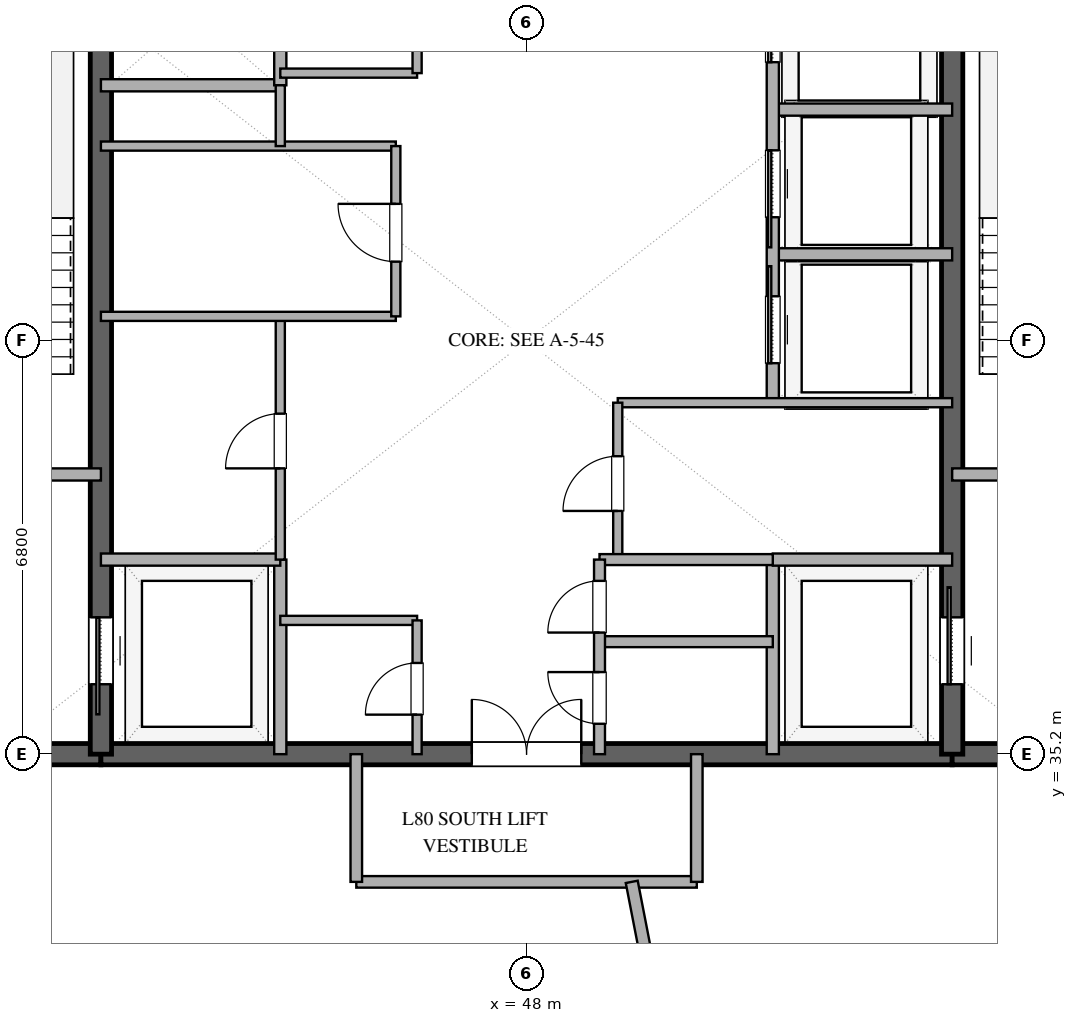
"""IFC4 building model, lengths in metres.
Left out: names, types, materials, properties, quantities, classifications, styles, units other than length and angle.
Written with IfcOpenShell. Run it as: python <this file> out.ifc"""

import sys

from ifc_helpers import new_model, si_unit, direction, frame, frame_2d, origin, place, context, subcontext, project, spatial, rectangle, extrude, element, fill, save


model = new_model("IFC4")
c1 = context("Model", 3, precision=1e-05, world=origin(), true_north=direction((0.0, 1.0)))
c2 = subcontext(c1, "Body", "Model", "MODEL_VIEW")
j1 = project(units=[si_unit("LENGTHUNIT", "METRE"), si_unit("PLANEANGLEUNIT", "RADIAN")], contexts=[c1])
p1 = place(None, origin())
s1 = spatial("IfcSite", under=j1, at=p1, CompositionType="ELEMENT")
p2 = place(p1, origin())
s2 = spatial("IfcBuilding", under=s1, at=p2, CompositionType="ELEMENT")
p3 = place(p2, frame((0.0, 0.0, 309.0)))
s3 = spatial("IfcBuildingStorey", under=s2, at=p3, CompositionType="ELEMENT", Elevation=309.0)
p4 = place(p3, frame((37.0, 35.2, 0.0), z_axis=(0.0, 0.0, 1.0), x_axis=(1.0, 0.0, 0.0)))
e1 = element("IfcWall", 1, at=p4, inside=s3, PredefinedType="SHEAR", context=c2, shape_type="SweptSolid", body=[
    extrude(rectangle(XDim=4.0, YDim=0.35, at=frame_2d((2.0, 0.0))), origin(), (0.0, 0.0, 1.0), 3.37),
])
p5 = place(p3, frame((41.0, 35.2, 0.0), z_axis=(0.0, 0.0, 1.0), x_axis=(1.0, 0.0, 0.0)))
e2 = element("IfcWall", 2, at=p5, inside=s3, PredefinedType="SHEAR", context=c2, shape_type="SweptSolid", body=[
    extrude(rectangle(XDim=14.0, YDim=0.35, at=frame_2d((7.0, 0.0))), origin(), (0.0, 0.0, 1.0), 3.37),
])
p6 = place(p5, frame((6.1, 0.0, 0.0)))
e3 = element("IfcOpeningElement", 3, at=p6, cuts=e2, PredefinedType="OPENING", context=c2, shape_type="SweptSolid", body=[
    extrude(rectangle(XDim=1.8, YDim=2.25, at=frame_2d((0.9, 1.125))), frame((0.0, 0.185, 0.0), z_axis=(0.0, -1.0, 0.0), x_axis=(1.0, 0.0, 0.0)), (0.0, 0.0, 1.0), 0.37),
])
p7 = place(p3, frame((55.0, 35.2, 0.0), z_axis=(0.0, 0.0, 1.0), x_axis=(1.0, 0.0, 0.0)))
e4 = element("IfcWall", 4, at=p7, inside=s3, PredefinedType="SHEAR", context=c2, shape_type="SweptSolid", body=[
    extrude(rectangle(XDim=4.0, YDim=0.35, at=frame_2d((2.0, 0.0))), origin(), (0.0, 0.0, 1.0), 3.37),
])
p8 = place(p3, frame((41.0, 35.2, 0.0), z_axis=(0.0, 0.0, 1.0), x_axis=(0.0, 1.0, 0.0)))
e5 = element("IfcWall", 5, at=p8, inside=s3, PredefinedType="SHEAR", context=c2, shape_type="SweptSolid", body=[
    extrude(rectangle(XDim=13.6, YDim=0.35, at=frame_2d((6.8, 0.0))), origin(), (0.0, 0.0, 1.0), 3.37),
])
p9 = place(p8, frame((1.15, 0.0, 0.0)))
e6 = element("IfcOpeningElement", 6, at=p9, cuts=e5, PredefinedType="OPENING", context=c2, shape_type="SweptSolid", body=[
    extrude(rectangle(XDim=1.1, YDim=2.2, at=frame_2d((0.55, 1.1))), frame((0.0, 0.185, 0.0), z_axis=(0.0, -1.0, 0.0), x_axis=(1.0, 0.0, 0.0)), (0.0, 0.0, 1.0), 0.37),
])
p10 = place(p3, frame((55.0, 35.2, 0.0), z_axis=(0.0, 0.0, 1.0), x_axis=(0.0, 1.0, 0.0)))
e7 = element("IfcWall", 7, at=p10, inside=s3, PredefinedType="SHEAR", context=c2, shape_type="SweptSolid", body=[
    extrude(rectangle(XDim=13.6, YDim=0.35, at=frame_2d((6.8, 0.0))), origin(), (0.0, 0.0, 1.0), 3.37),
])
p11 = place(p10, frame((1.15, 0.0, 0.0)))
e8 = element("IfcOpeningElement", 8, at=p11, cuts=e7, PredefinedType="OPENING", context=c2, shape_type="SweptSolid", body=[
    extrude(rectangle(XDim=1.1, YDim=2.2, at=frame_2d((0.55, 1.1))), frame((0.0, 0.185, 0.0), z_axis=(0.0, -1.0, 0.0), x_axis=(1.0, 0.0, 0.0)), (0.0, 0.0, 1.0), 0.37),
])
p12 = place(p3, frame((37.0, 39.8, 0.0), z_axis=(0.0, 0.0, 1.0), x_axis=(1.0, 0.0, 0.0)))
e9 = element("IfcWall", 9, at=p12, inside=s3, PredefinedType="SOLIDWALL", context=c2, shape_type="SweptSolid", body=[
    extrude(rectangle(XDim=4.0, YDim=0.2, at=frame_2d((2.0, 0.0))), origin(), (0.0, 0.0, 1.0), 2.73),
])
p13 = place(p12, frame((1.45, 0.0, 0.0)))
e10 = element("IfcOpeningElement", 10, at=p13, cuts=e9, PredefinedType="OPENING", context=c2, shape_type="SweptSolid", body=[
    extrude(rectangle(XDim=1.1, YDim=2.15, at=frame_2d((0.55, 1.075))), frame((0.0, 0.11, 0.0), z_axis=(0.0, -1.0, 0.0), x_axis=(1.0, 0.0, 0.0)), (0.0, 0.0, 1.0), 0.22),
])
p14 = place(p3, frame((55.0, 39.8, 0.0), z_axis=(0.0, 0.0, 1.0), x_axis=(1.0, 0.0, 0.0)))
e11 = element("IfcWall", 11, at=p14, inside=s3, PredefinedType="SOLIDWALL", context=c2, shape_type="SweptSolid", body=[
    extrude(rectangle(XDim=4.0, YDim=0.2, at=frame_2d((2.0, 0.0))), origin(), (0.0, 0.0, 1.0), 2.73),
])
p15 = place(p14, frame((1.45, 0.0, 0.0)))
e12 = element("IfcOpeningElement", 12, at=p15, cuts=e11, PredefinedType="OPENING", context=c2, shape_type="SweptSolid", body=[
    extrude(rectangle(XDim=1.1, YDim=2.15, at=frame_2d((0.55, 1.075))), frame((0.0, 0.11, 0.0), z_axis=(0.0, -1.0, 0.0), x_axis=(1.0, 0.0, 0.0)), (0.0, 0.0, 1.0), 0.22),
])
p16 = place(p3, frame((43.95, 35.2, 0.0), z_axis=(0.0, 0.0, 1.0), x_axis=(0.0, 1.0, 0.0)))
e13 = element("IfcWall", 13, at=p16, inside=s3, PredefinedType="SOLIDWALL", context=c2, shape_type="SweptSolid", body=[
    extrude(rectangle(XDim=3.2, YDim=0.2, at=frame_2d((1.6, 0.0))), origin(), (0.0, 0.0, 1.0), 2.73),
])
p17 = place(p3, frame((41.0, 38.4, 0.0), z_axis=(0.0, 0.0, 1.0), x_axis=(1.0, 0.0, 0.0)))
e14 = element("IfcWall", 14, at=p17, inside=s3, PredefinedType="SOLIDWALL", context=c2, shape_type="SweptSolid", body=[
    extrude(rectangle(XDim=2.95, YDim=0.2, at=frame_2d((1.475, 0.0))), origin(), (0.0, 0.0, 1.0), 2.73),
])
p18 = place(p3, frame((52.05, 35.2, 0.0), z_axis=(0.0, 0.0, 1.0), x_axis=(0.0, 1.0, 0.0)))
e15 = element("IfcWall", 15, at=p18, inside=s3, PredefinedType="SOLIDWALL", context=c2, shape_type="SweptSolid", body=[
    extrude(rectangle(XDim=3.2, YDim=0.2, at=frame_2d((1.6, 0.0))), origin(), (0.0, 0.0, 1.0), 2.73),
])
for number, where, z_axis, x_axis in (
    (16, (52.05, 38.4, 0.0), (0.0, 0.0, 1.0), (1.0, 0.0, 0.0)),
    (17, (41.0, 46.2, 0.0), (0.0, 0.0, 1.0), (1.0, 0.0, 0.0)),
):
    element("IfcWall", number, at=place(p3, frame(where, z_axis=z_axis, x_axis=x_axis)), inside=s3, PredefinedType="SOLIDWALL", context=c2, shape_type="SweptSolid", body=[
        extrude(rectangle(XDim=2.95, YDim=0.2, at=frame_2d((1.475, 0.0))), origin(), (0.0, 0.0, 1.0), 2.73),
    ])
p19 = place(p3, frame((43.95, 46.2, 0.0), z_axis=(0.0, 0.0, 1.0), x_axis=(0.0, 1.0, 0.0)))
e18 = element("IfcWall", 18, at=p19, inside=s3, PredefinedType="SOLIDWALL", context=c2, shape_type="SweptSolid", body=[
    extrude(rectangle(XDim=2.6, YDim=0.2, at=frame_2d((1.3, 0.0))), origin(), (0.0, 0.0, 1.0), 2.73),
])
p20 = place(p19, frame((0.8, 0.0, 0.0)))
e19 = element("IfcOpeningElement", 19, at=p20, cuts=e18, PredefinedType="OPENING", context=c2, shape_type="SweptSolid", body=[
    extrude(rectangle(XDim=0.85, YDim=2.15, at=frame_2d((0.425, 1.075))), frame((0.0, 0.11, 0.0), z_axis=(0.0, -1.0, 0.0), x_axis=(1.0, 0.0, 0.0)), (0.0, 0.0, 1.0), 0.22),
])
p21 = place(p3, frame((43.95, 38.4, 0.0), z_axis=(0.0, 0.0, 1.0), x_axis=(0.0, 1.0, 0.0)))
e20 = element("IfcWall", 20, at=p21, inside=s3, PredefinedType="PARTITIONING", context=c2, shape_type="SweptSolid", body=[
    extrude(rectangle(XDim=4.0, YDim=0.15, at=frame_2d((2.0, 0.0))), origin(), (0.0, 0.0, 1.0), 2.73),
])
p22 = place(p21, frame((1.5, 0.0, 0.0)))
e21 = element("IfcOpeningElement", 21, at=p22, cuts=e20, PredefinedType="OPENING", context=c2, shape_type="SweptSolid", body=[
    extrude(rectangle(XDim=0.9, YDim=2.15, at=frame_2d((0.45, 1.075))), frame((0.0, 0.085, 0.0), z_axis=(0.0, -1.0, 0.0), x_axis=(1.0, 0.0, 0.0)), (0.0, 0.0, 1.0), 0.17),
])
for number, where, z_axis, x_axis in (
    (22, (41.0, 42.4, 0.0), (0.0, 0.0, 1.0), (1.0, 0.0, 0.0)),
    (23, (41.0, 45.2, 0.0), (0.0, 0.0, 1.0), (1.0, 0.0, 0.0)),
):
    element("IfcWall", number, at=place(p3, frame(where, z_axis=z_axis, x_axis=x_axis)), inside=s3, PredefinedType="PARTITIONING", context=c2, shape_type="SweptSolid", body=[
        extrude(rectangle(XDim=4.85, YDim=0.15, at=frame_2d((2.425, 0.0))), origin(), (0.0, 0.0, 1.0), 2.73),
    ])
p23 = place(p3, frame((43.95, 45.2, 0.0), z_axis=(0.0, 0.0, 1.0), x_axis=(0.0, 1.0, 0.0)))
e24 = element("IfcWall", 24, at=p23, inside=s3, PredefinedType="PARTITIONING", context=c2, shape_type="SweptSolid", body=[
    extrude(rectangle(XDim=1.0, YDim=0.15, at=frame_2d((0.5, 0.0))), origin(), (0.0, 0.0, 1.0), 2.73),
])
p24 = place(p3, frame((45.85, 42.4, 0.0), z_axis=(0.0, 0.0, 1.0), x_axis=(0.0, 1.0, 0.0)))
e25 = element("IfcWall", 25, at=p24, inside=s3, PredefinedType="PARTITIONING", context=c2, shape_type="SweptSolid", body=[
    extrude(rectangle(XDim=2.8, YDim=0.15, at=frame_2d((1.4, 0.0))), origin(), (0.0, 0.0, 1.0), 2.73),
])
p25 = place(p24, frame((0.9, 0.0, 0.0)))
e26 = element("IfcOpeningElement", 26, at=p25, cuts=e25, PredefinedType="OPENING", context=c2, shape_type="SweptSolid", body=[
    extrude(rectangle(XDim=0.95, YDim=2.15, at=frame_2d((0.475, 1.075))), frame((0.0, 0.085, 0.0), z_axis=(0.0, -1.0, 0.0), x_axis=(1.0, 0.0, 0.0)), (0.0, 0.0, 1.0), 0.17),
])
for number, where, z_axis, x_axis in (
    (27, (52.05, 43.42, 0.0), (0.0, 0.0, 1.0), (1.0, 0.0, 0.0)),
    (28, (52.05, 45.8, 0.0), (0.0, 0.0, 1.0), (1.0, 0.0, 0.0)),
):
    element("IfcWall", number, at=place(p3, frame(where, z_axis=z_axis, x_axis=x_axis)), inside=s3, PredefinedType="SOLIDWALL", context=c2, shape_type="SweptSolid", body=[
        extrude(rectangle(XDim=2.95, YDim=0.2, at=frame_2d((1.475, 0.0))), origin(), (0.0, 0.0, 1.0), 2.73),
    ])
p26 = place(p3, frame((52.05, 40.98, 0.0), z_axis=(0.0, 0.0, 1.0), x_axis=(0.0, 1.0, 0.0)))
e29 = element("IfcWall", 29, at=p26, inside=s3, PredefinedType="SOLIDWALL", context=c2, shape_type="SweptSolid", body=[
    extrude(rectangle(XDim=7.82, YDim=0.2, at=frame_2d((3.91, 0.0))), origin(), (0.0, 0.0, 1.0), 2.73),
])
p27 = place(p26, frame((0.65, 0.0, 0.0)))
e30 = element("IfcOpeningElement", 30, at=p27, cuts=e29, PredefinedType="OPENING", context=c2, shape_type="SweptSolid", body=[
    extrude(rectangle(XDim=1.1, YDim=2.2, at=frame_2d((0.55, 1.1))), frame((0.0, 0.11, 0.0), z_axis=(0.0, -1.0, 0.0), x_axis=(1.0, 0.0, 0.0)), (0.0, 0.0, 1.0), 0.22),
])
p28 = place(p26, frame((3.05, 0.0, 0.0)))
e31 = element("IfcOpeningElement", 31, at=p28, cuts=e29, PredefinedType="OPENING", context=c2, shape_type="SweptSolid", body=[
    extrude(rectangle(XDim=1.1, YDim=2.2, at=frame_2d((0.55, 1.1))), frame((0.0, 0.11, 0.0), z_axis=(0.0, -1.0, 0.0), x_axis=(1.0, 0.0, 0.0)), (0.0, 0.0, 1.0), 0.22),
])
p29 = place(p26, frame((5.6, 0.0, 0.0)))
e32 = element("IfcOpeningElement", 32, at=p29, cuts=e29, PredefinedType="OPENING", context=c2, shape_type="SweptSolid", body=[
    extrude(rectangle(XDim=1.2, YDim=2.2, at=frame_2d((0.6, 1.1))), frame((0.0, 0.11, 0.0), z_axis=(0.0, -1.0, 0.0), x_axis=(1.0, 0.0, 0.0)), (0.0, 0.0, 1.0), 0.22),
])
p30 = place(p3, frame((49.5, 40.98, 0.0), z_axis=(0.0, 0.0, 1.0), x_axis=(1.0, 0.0, 0.0)))
e33 = element("IfcWall", 33, at=p30, inside=s3, PredefinedType="PARTITIONING", context=c2, shape_type="SweptSolid", body=[
    extrude(rectangle(XDim=5.5, YDim=0.15, at=frame_2d((2.75, 0.0))), origin(), (0.0, 0.0, 1.0), 2.73),
])
p31 = place(p3, frame((49.5, 38.4, 0.0), z_axis=(0.0, 0.0, 1.0), x_axis=(0.0, 1.0, 0.0)))
e34 = element("IfcWall", 34, at=p31, inside=s3, PredefinedType="PARTITIONING", context=c2, shape_type="SweptSolid", body=[
    extrude(rectangle(XDim=2.58, YDim=0.15, at=frame_2d((1.29, 0.0))), origin(), (0.0, 0.0, 1.0), 2.73),
])
p32 = place(p31, frame((0.8, 0.0, 0.0)))
e35 = element("IfcOpeningElement", 35, at=p32, cuts=e34, PredefinedType="OPENING", context=c2, shape_type="SweptSolid", body=[
    extrude(rectangle(XDim=0.9, YDim=2.15, at=frame_2d((0.45, 1.075))), frame((0.0, 0.085, 0.0), z_axis=(0.0, -1.0, 0.0), x_axis=(1.0, 0.0, 0.0)), (0.0, 0.0, 1.0), 0.17),
])
p33 = place(p3, frame((43.95, 37.4, 0.0), z_axis=(0.0, 0.0, 1.0), x_axis=(1.0, 0.0, 0.0)))
e36 = element("IfcWall", 36, at=p33, inside=s3, PredefinedType="PARTITIONING", context=c2, shape_type="SweptSolid", body=[
    extrude(rectangle(XDim=2.25, YDim=0.15, at=frame_2d((1.125, 0.0))), origin(), (0.0, 0.0, 1.0), 2.73),
])
p34 = place(p3, frame((46.2, 35.2, 0.0), z_axis=(0.0, 0.0, 1.0), x_axis=(0.0, 1.0, 0.0)))
e37 = element("IfcWall", 37, at=p34, inside=s3, PredefinedType="PARTITIONING", context=c2, shape_type="SweptSolid", body=[
    extrude(rectangle(XDim=2.2, YDim=0.15, at=frame_2d((1.1, 0.0))), origin(), (0.0, 0.0, 1.0), 2.73),
])
p35 = place(p34, frame((0.65, 0.0, 0.0)))
e38 = element("IfcOpeningElement", 38, at=p35, cuts=e37, PredefinedType="OPENING", context=c2, shape_type="SweptSolid", body=[
    extrude(rectangle(XDim=0.85, YDim=2.15, at=frame_2d((0.425, 1.075))), frame((0.0, 0.085, 0.0), z_axis=(0.0, -1.0, 0.0), x_axis=(1.0, 0.0, 0.0)), (0.0, 0.0, 1.0), 0.17),
])
p36 = place(p3, frame((43.95, 46.4, 0.0), z_axis=(0.0, 0.0, 1.0), x_axis=(1.0, 0.0, 0.0)))
e39 = element("IfcWall", 39, at=p36, inside=s3, PredefinedType="PARTITIONING", context=c2, shape_type="SweptSolid", body=[
    extrude(rectangle(XDim=2.25, YDim=0.15, at=frame_2d((1.125, 0.0))), origin(), (0.0, 0.0, 1.0), 2.73),
])
p37 = place(p3, frame((46.2, 46.4, 0.0), z_axis=(0.0, 0.0, 1.0), x_axis=(0.0, 1.0, 0.0)))
e40 = element("IfcWall", 40, at=p37, inside=s3, PredefinedType="PARTITIONING", context=c2, shape_type="SweptSolid", body=[
    extrude(rectangle(XDim=2.4, YDim=0.15, at=frame_2d((1.2, 0.0))), origin(), (0.0, 0.0, 1.0), 2.73),
])
p38 = place(p37, frame((0.75, 0.0, 0.0)))
e41 = element("IfcOpeningElement", 41, at=p38, cuts=e40, PredefinedType="OPENING", context=c2, shape_type="SweptSolid", body=[
    extrude(rectangle(XDim=0.85, YDim=2.15, at=frame_2d((0.425, 1.075))), frame((0.0, 0.085, 0.0), z_axis=(0.0, -1.0, 0.0), x_axis=(1.0, 0.0, 0.0)), (0.0, 0.0, 1.0), 0.17),
])
for number, where, z_axis, x_axis in (
    (42, (49.2, 37.05, 0.0), (0.0, 0.0, 1.0), (1.0, 0.0, 0.0)),
    (43, (49.2, 38.4, 0.0), (0.0, 0.0, 1.0), (1.0, 0.0, 0.0)),
):
    element("IfcWall", number, at=place(p3, frame(where, z_axis=z_axis, x_axis=x_axis)), inside=s3, PredefinedType="PLUMBINGWALL", context=c2, shape_type="SweptSolid", body=[
        extrude(rectangle(XDim=2.85, YDim=0.18, at=frame_2d((1.425, 0.0))), origin(), (0.0, 0.0, 1.0), 2.73),
    ])
p39 = place(p3, frame((49.2, 35.2, 0.0), z_axis=(0.0, 0.0, 1.0), x_axis=(0.0, 1.0, 0.0)))
e44 = element("IfcWall", 44, at=p39, inside=s3, PredefinedType="PLUMBINGWALL", context=c2, shape_type="SweptSolid", body=[
    extrude(rectangle(XDim=3.2, YDim=0.18, at=frame_2d((1.6, 0.0))), origin(), (0.0, 0.0, 1.0), 2.73),
])
p40 = place(p39, frame((0.5, 0.0, 0.0)))
e45 = element("IfcOpeningElement", 45, at=p40, cuts=e44, PredefinedType="OPENING", context=c2, shape_type="SweptSolid", body=[
    extrude(rectangle(XDim=0.85, YDim=2.1, at=frame_2d((0.425, 1.05))), frame((0.0, 0.1, 0.0), z_axis=(0.0, -1.0, 0.0), x_axis=(1.0, 0.0, 0.0)), (0.0, 0.0, 1.0), 0.2),
])
p41 = place(p39, frame((2.0, 0.0, 0.0)))
e46 = element("IfcOpeningElement", 46, at=p41, cuts=e44, PredefinedType="OPENING", context=c2, shape_type="SweptSolid", body=[
    extrude(rectangle(XDim=0.85, YDim=2.15, at=frame_2d((0.425, 1.075))), frame((0.0, 0.1, 0.0), z_axis=(0.0, -1.0, 0.0), x_axis=(1.0, 0.0, 0.0)), (0.0, 0.0, 1.0), 0.2),
])
p42 = place(p3, frame((50.8, 33.1, 0.0), z_axis=(0.0, 0.0, 1.0), x_axis=(-1.0, 0.0, 0.0)))
e47 = element("IfcWall", 47, at=p42, inside=s3, PredefinedType="PARTITIONING", context=c2, shape_type="SweptSolid", body=[
    extrude(rectangle(XDim=5.6, YDim=0.19, at=frame_2d((2.8, 0.0))), origin(), (0.0, 0.0, 1.0), 2.73),
])
p43 = place(p3, frame((50.291, 30.216, 0.0), z_axis=(0.0, 0.0, 1.0), x_axis=(-0.190807376865, 0.981627498053, 0.0)))
e48 = element("IfcWall", 48, at=p43, inside=s3, PredefinedType="PARTITIONING", context=c2, shape_type="SweptSolid", body=[
    extrude(rectangle(XDim=2.938, YDim=0.2, at=frame_2d((1.469, 0.0))), origin(), (0.0, 0.0, 1.0), 2.73),
])
for number, where, z_axis, x_axis in (
    (49, (45.2, 33.1, 0.0), (0.0, 0.0, 1.0), (0.0, 1.0, 0.0)),
    (50, (50.8, 35.2, 0.0), (0.0, 0.0, 1.0), (0.0, -1.0, 0.0)),
):
    element("IfcWall", number, at=place(p3, frame(where, z_axis=z_axis, x_axis=x_axis)), inside=s3, PredefinedType="PARTITIONING", context=c2, shape_type="SweptSolid", body=[
        extrude(rectangle(XDim=2.1, YDim=0.19, at=frame_2d((1.05, 0.0))), origin(), (0.0, 0.0, 1.0), 2.73),
    ])
p44 = place(p9, origin())
e51 = element("IfcDoor", 51, at=p44, inside=s3, OperationType="SLIDING_TO_LEFT", PredefinedType="DOOR", context=c2, shape_type="SweptSolid", body=[
    extrude(rectangle(XDim=1.1, YDim=2.2, at=frame_2d((0.55, 1.1))), frame((0.0, 0.025, 0.0), z_axis=(0.0, -1.0, 0.0), x_axis=(1.0, 0.0, 0.0)), (0.0, 0.0, 1.0), 0.05),
])
fill(e6, e51)
p45 = place(p11, origin())
e52 = element("IfcDoor", 52, at=p45, inside=s3, OperationType="SLIDING_TO_RIGHT", PredefinedType="DOOR", context=c2, shape_type="SweptSolid", body=[
    extrude(rectangle(XDim=1.1, YDim=2.2, at=frame_2d((0.55, 1.1))), frame((0.0, 0.025, 0.0), z_axis=(0.0, -1.0, 0.0), x_axis=(1.0, 0.0, 0.0)), (0.0, 0.0, 1.0), 0.05),
])
fill(e8, e52)
p46 = place(p6, origin())
e53 = element("IfcDoor", 53, at=p46, inside=s3, OperationType="DOUBLE_DOOR_SINGLE_SWING", PredefinedType="DOOR", context=c2, shape_type="SweptSolid", body=[
    extrude(rectangle(XDim=1.8, YDim=2.25, at=frame_2d((0.9, 1.125))), frame((0.0, 0.025, 0.0), z_axis=(0.0, -1.0, 0.0), x_axis=(1.0, 0.0, 0.0)), (0.0, 0.0, 1.0), 0.05),
])
fill(e3, e53)
p47 = place(p22, origin())
e54 = element("IfcDoor", 54, at=p47, inside=s3, OperationType="SINGLE_SWING_LEFT", PredefinedType="DOOR", context=c2, shape_type="SweptSolid", body=[
    extrude(rectangle(XDim=0.9, YDim=2.15, at=frame_2d((0.45, 1.075))), frame((0.0, 0.025, 0.0), z_axis=(0.0, -1.0, 0.0), x_axis=(1.0, 0.0, 0.0)), (0.0, 0.0, 1.0), 0.05),
])
fill(e21, e54)
p48 = place(p25, origin())
e55 = element("IfcDoor", 55, at=p48, inside=s3, OperationType="SINGLE_SWING_RIGHT", PredefinedType="DOOR", context=c2, shape_type="SweptSolid", body=[
    extrude(rectangle(XDim=0.95, YDim=2.15, at=frame_2d((0.475, 1.075))), frame((0.0, 0.025, 0.0), z_axis=(0.0, -1.0, 0.0), x_axis=(1.0, 0.0, 0.0)), (0.0, 0.0, 1.0), 0.05),
])
fill(e26, e55)
p49 = place(p27, origin())
e56 = element("IfcDoor", 56, at=p49, inside=s3, OperationType="SLIDING_TO_RIGHT", PredefinedType="DOOR", context=c2, shape_type="SweptSolid", body=[
    extrude(rectangle(XDim=1.1, YDim=2.2, at=frame_2d((0.55, 1.1))), frame((0.0, 0.025, 0.0), z_axis=(0.0, -1.0, 0.0), x_axis=(1.0, 0.0, 0.0)), (0.0, 0.0, 1.0), 0.05),
])
fill(e30, e56)
p50 = place(p28, origin())
e57 = element("IfcDoor", 57, at=p50, inside=s3, OperationType="SLIDING_TO_LEFT", PredefinedType="DOOR", context=c2, shape_type="SweptSolid", body=[
    extrude(rectangle(XDim=1.1, YDim=2.2, at=frame_2d((0.55, 1.1))), frame((0.0, 0.025, 0.0), z_axis=(0.0, -1.0, 0.0), x_axis=(1.0, 0.0, 0.0)), (0.0, 0.0, 1.0), 0.05),
])
fill(e31, e57)
p51 = place(p29, origin())
e58 = element("IfcDoor", 58, at=p51, inside=s3, OperationType="SLIDING_TO_RIGHT", PredefinedType="DOOR", context=c2, shape_type="SweptSolid", body=[
    extrude(rectangle(XDim=1.2, YDim=2.2, at=frame_2d((0.6, 1.1))), frame((0.0, 0.025, 0.0), z_axis=(0.0, -1.0, 0.0), x_axis=(1.0, 0.0, 0.0)), (0.0, 0.0, 1.0), 0.05),
])
fill(e32, e58)
p52 = place(p32, origin())
e59 = element("IfcDoor", 59, at=p52, inside=s3, OperationType="SINGLE_SWING_LEFT", PredefinedType="DOOR", context=c2, shape_type="SweptSolid", body=[
    extrude(rectangle(XDim=0.9, YDim=2.15, at=frame_2d((0.45, 1.075))), frame((0.0, 0.025, 0.0), z_axis=(0.0, -1.0, 0.0), x_axis=(1.0, 0.0, 0.0)), (0.0, 0.0, 1.0), 0.05),
])
fill(e35, e59)
p53 = place(p35, origin())
e60 = element("IfcDoor", 60, at=p53, inside=s3, OperationType="SINGLE_SWING_LEFT", PredefinedType="DOOR", context=c2, shape_type="SweptSolid", body=[
    extrude(rectangle(XDim=0.85, YDim=2.15, at=frame_2d((0.425, 1.075))), frame((0.0, 0.025, 0.0), z_axis=(0.0, -1.0, 0.0), x_axis=(1.0, 0.0, 0.0)), (0.0, 0.0, 1.0), 0.05),
])
fill(e38, e60)
p54 = place(p40, origin())
e61 = element("IfcDoor", 61, at=p54, inside=s3, OperationType="SINGLE_SWING_RIGHT", PredefinedType="DOOR", context=c2, shape_type="SweptSolid", body=[
    extrude(rectangle(XDim=0.85, YDim=2.1, at=frame_2d((0.425, 1.05))), frame((0.0, 0.025, 0.0), z_axis=(0.0, -1.0, 0.0), x_axis=(1.0, 0.0, 0.0)), (0.0, 0.0, 1.0), 0.05),
])
fill(e45, e61)
p55 = place(p41, origin())
e62 = element("IfcDoor", 62, at=p55, inside=s3, OperationType="SINGLE_SWING_LEFT", PredefinedType="DOOR", context=c2, shape_type="SweptSolid", body=[
    extrude(rectangle(XDim=0.85, YDim=2.15, at=frame_2d((0.425, 1.075))), frame((0.0, 0.025, 0.0), z_axis=(0.0, -1.0, 0.0), x_axis=(1.0, 0.0, 0.0)), (0.0, 0.0, 1.0), 0.05),
])
fill(e46, e62)
save(model, sys.argv[1])
